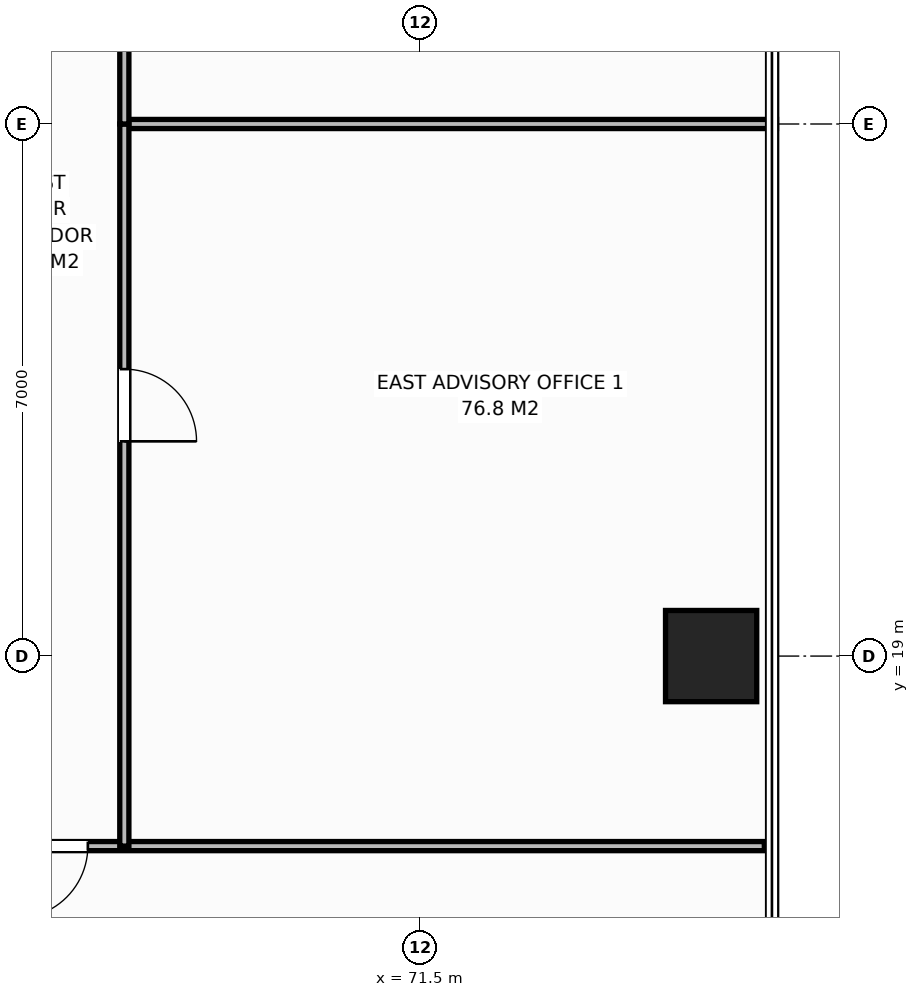
"""IFC4 building model, lengths in metres.
Left out: names, types, materials, properties, quantities, classifications, styles, units other than length and angle.
Written with IfcOpenShell. Run it as: python <this file> out.ifc"""

import sys

from ifc_helpers import new_model, si_unit, direction, frame, frame_2d, origin, origin_2d, place, context, subcontext, project, spatial, rectangle, extrude, element, fill, save


model = new_model("IFC4")
c1 = context("Model", 3, precision=1e-05, world=origin(), true_north=direction((0.0, 1.0)))
c2 = subcontext(c1, "Body", "Model", "MODEL_VIEW")
j1 = project(units=[si_unit("LENGTHUNIT", "METRE"), si_unit("PLANEANGLEUNIT", "RADIAN")], contexts=[c1])
p1 = place(None, origin())
s1 = spatial("IfcSite", under=j1, at=p1, CompositionType="ELEMENT")
p2 = place(p1, origin())
s2 = spatial("IfcBuilding", under=s1, at=p2, CompositionType="ELEMENT")
p3 = place(p2, frame((0.0, 0.0, 93.6)))
s3 = spatial("IfcBuildingStorey", under=s2, at=p3, CompositionType="ELEMENT", Elevation=93.6)
p4 = place(p3, frame((75.32, 19.0, 0.0), z_axis=(0.0, 0.0, 1.0), x_axis=(1.0, 0.0, 0.0)))
e1 = element("IfcColumn", 1, at=p4, inside=s3, PredefinedType="COLUMN", context=c2, shape_type="SweptSolid", body=[
    extrude(rectangle(XDim=1.2, YDim=1.2, at=origin_2d()), origin(), (0.0, 0.0, 1.0), 3.8),
])
p5 = place(p3, frame((64.86, 16.5, 0.0), z_axis=(0.0, 0.0, 1.0), x_axis=(1.0, 0.0, 0.0)))
e2 = element("IfcWall", 2, at=p5, inside=s3, PredefinedType="PARTITIONING", context=c2, shape_type="SweptSolid", body=[
    extrude(rectangle(XDim=11.16, YDim=0.12, at=frame_2d((5.58, 0.0))), origin(), (0.0, 0.0, 1.0), 3.565),
])
p6 = place(p5, frame((1.31, 0.0, 0.0)))
e3 = element("IfcOpeningElement", 3, at=p6, cuts=e2, PredefinedType="OPENING", context=c2, shape_type="SweptSolid", body=[
    extrude(rectangle(XDim=0.95, YDim=2.15, at=frame_2d((0.475, 1.075))), frame((0.0, 0.07, 0.0), z_axis=(0.0, -1.0, 0.0), x_axis=(1.0, 0.0, 0.0)), (0.0, 0.0, 1.0), 0.14),
])
p7 = place(p3, frame((67.6, 26.0, 0.0), z_axis=(0.0, 0.0, 1.0), x_axis=(1.0, 0.0, 0.0)))
e4 = element("IfcWall", 4, at=p7, inside=s3, PredefinedType="PARTITIONING", context=c2, shape_type="SweptSolid", body=[
    extrude(rectangle(XDim=8.58, YDim=0.12, at=frame_2d((4.29, 0.0))), origin(), (0.0, 0.0, 1.0), 3.565),
])
p8 = place(p3, frame((67.6, 16.5, 0.0), z_axis=(0.0, 0.0, 1.0), x_axis=(0.0, 1.0, 0.0)))
e5 = element("IfcWall", 5, at=p8, inside=s3, PredefinedType="PARTITIONING", context=c2, shape_type="SweptSolid", body=[
    extrude(rectangle(XDim=9.5, YDim=0.12, at=frame_2d((4.75, 0.0))), origin(), (0.0, 0.0, 1.0), 3.565),
])
p9 = place(p8, frame((5.325, 0.0, 0.0)))
e6 = element("IfcOpeningElement", 6, at=p9, cuts=e5, PredefinedType="OPENING", context=c2, shape_type="SweptSolid", body=[
    extrude(rectangle(XDim=0.95, YDim=2.15, at=frame_2d((0.475, 1.075))), frame((0.0, 0.07, 0.0), z_axis=(0.0, -1.0, 0.0), x_axis=(1.0, 0.0, 0.0)), (0.0, 0.0, 1.0), 0.14),
])
p10 = place(p3, frame((67.6, 26.0, 0.0), z_axis=(0.0, 0.0, 1.0), x_axis=(0.0, 1.0, 0.0)))
e7 = element("IfcWall", 7, at=p10, inside=s3, PredefinedType="PARTITIONING", context=c2, shape_type="SweptSolid", body=[
    extrude(rectangle(XDim=9.5, YDim=0.12, at=frame_2d((4.75, 0.0))), origin(), (0.0, 0.0, 1.0), 3.565),
])
p11 = place(p10, frame((3.225, 0.0, 0.0)))
e8 = element("IfcOpeningElement", 8, at=p11, cuts=e7, PredefinedType="OPENING", context=c2, shape_type="SweptSolid", body=[
    extrude(rectangle(XDim=0.95, YDim=2.15, at=frame_2d((0.475, 1.075))), frame((0.0, 0.07, 0.0), z_axis=(0.0, -1.0, 0.0), x_axis=(1.0, 0.0, 0.0)), (0.0, 0.0, 1.0), 0.14),
])
p12 = place(p6, origin())
e9 = element("IfcDoor", 9, at=p12, inside=s3, OperationType="SINGLE_SWING_RIGHT", PredefinedType="DOOR", context=c2, shape_type="SweptSolid", body=[
    extrude(rectangle(XDim=0.95, YDim=2.15, at=frame_2d((0.475, 1.075))), frame((0.0, 0.025, 0.0), z_axis=(0.0, -1.0, 0.0), x_axis=(1.0, 0.0, 0.0)), (0.0, 0.0, 1.0), 0.05),
])
fill(e3, e9)
p13 = place(p9, origin())
e10 = element("IfcDoor", 10, at=p13, inside=s3, OperationType="SINGLE_SWING_RIGHT", PredefinedType="DOOR", context=c2, shape_type="SweptSolid", body=[
    extrude(rectangle(XDim=0.95, YDim=2.15, at=frame_2d((0.475, 1.075))), frame((0.0, 0.025, 0.0), z_axis=(0.0, -1.0, 0.0), x_axis=(1.0, 0.0, 0.0)), (0.0, 0.0, 1.0), 0.05),
])
fill(e6, e10)
save(model, sys.argv[1])
